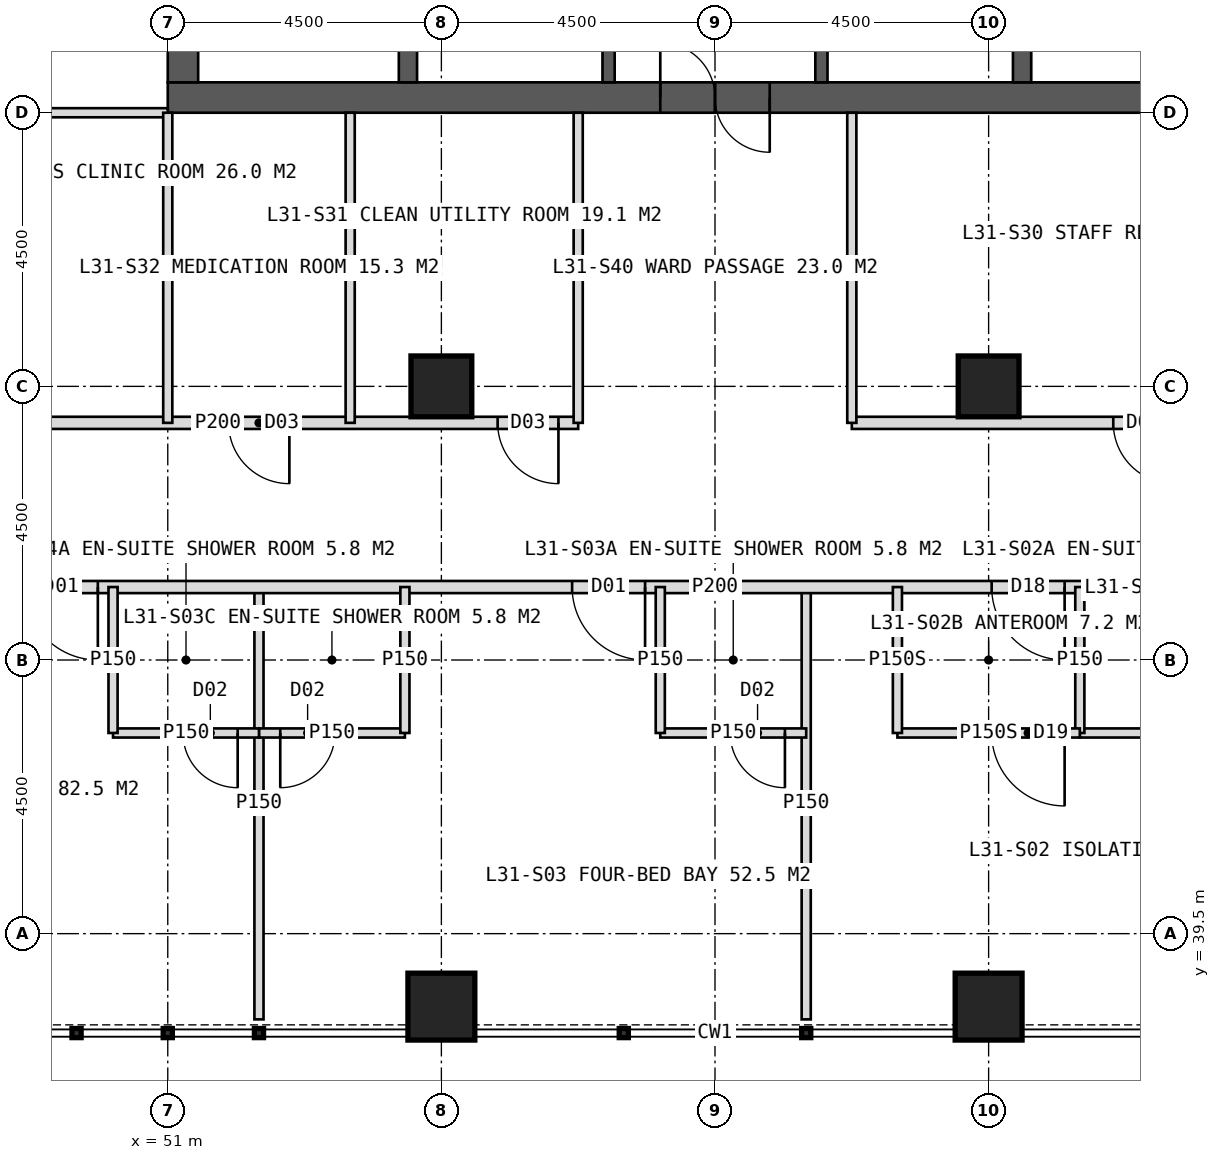
"""IFC4 building model, lengths in metres.
Left out: names, types, materials, properties, quantities, classifications, styles, units other than length and angle.
Written with IfcOpenShell. Run it as: python <this file> out.ifc"""

import sys

from ifc_helpers import new_model, si_unit, direction, frame, frame_2d, origin, origin_2d, place, context, subcontext, project, spatial, rectangle, hollow_rectangle, extrude, element, fill, save


model = new_model("IFC4")
c1 = context("Model", 3, precision=1e-05, world=origin(), true_north=direction((0.0, 1.0)))
c2 = subcontext(c1, "Body", "Model", "MODEL_VIEW")
j1 = project(units=[si_unit("LENGTHUNIT", "METRE"), si_unit("PLANEANGLEUNIT", "RADIAN")], contexts=[c1])
p1 = place(None, origin())
s1 = spatial("IfcSite", under=j1, at=p1, CompositionType="ELEMENT")
p2 = place(p1, origin())
s2 = spatial("IfcBuilding", under=s1, at=p2, CompositionType="ELEMENT")
p3 = place(p2, frame((0.0, 0.0, 132.0)))
s3 = spatial("IfcBuildingStorey", under=s2, at=p3, CompositionType="ELEMENT", Elevation=132.0)
p4 = place(p3, frame((51.0, 53.25, 0.0), z_axis=(0.0, 0.0, 1.0), x_axis=(1.0, 0.0, 0.0)))
e1 = element("IfcWall", 1, at=p4, inside=s3, PredefinedType="SHEAR", context=c2, shape_type="SweptSolid", body=[
    extrude(rectangle(XDim=18.0, YDim=0.5, at=frame_2d((9.0, 0.0))), origin(), (0.0, 0.0, 1.0), 4.0),
])
p5 = place(p4, frame((8.1, 0.0, 0.0)))
e2 = element("IfcOpeningElement", 2, at=p5, cuts=e1, PredefinedType="OPENING", context=c2, shape_type="SweptSolid", body=[
    extrude(rectangle(XDim=1.8, YDim=2.2, at=frame_2d((0.9, 1.1))), frame((0.0, 0.26, 0.0), z_axis=(0.0, -1.0, 0.0), x_axis=(1.0, 0.0, 0.0)), (0.0, 0.0, 1.0), 0.52),
])
p6 = place(p3, frame((51.25, 53.5, 0.0), z_axis=(0.0, 0.0, 1.0), x_axis=(0.0, 1.0, 0.0)))
e3 = element("IfcWall", 3, at=p6, inside=s3, PredefinedType="SHEAR", context=c2, shape_type="SweptSolid", body=[
    extrude(rectangle(XDim=17.0, YDim=0.5, at=frame_2d((8.5, 0.0))), origin(), (0.0, 0.0, 1.0), 4.0),
])
p7 = place(p6, frame((6.0, 0.0, 0.0)))
e4 = element("IfcOpeningElement", 4, at=p7, cuts=e3, PredefinedType="OPENING", context=c2, shape_type="SweptSolid", body=[
    extrude(rectangle(XDim=1.5, YDim=2.2, at=frame_2d((0.75, 1.1))), frame((0.0, 0.26, 0.0), z_axis=(0.0, -1.0, 0.0), x_axis=(1.0, 0.0, 0.0)), (0.0, 0.0, 1.0), 0.52),
])
for number, where, z_axis, x_axis in (
    (5, (54.95, 53.5, 0.0), (0.0, 0.0, 1.0), (0.0, 1.0, 0.0)),
    (6, (65.05, 53.5, 0.0), (0.0, 0.0, 1.0), (0.0, 1.0, 0.0)),
):
    element("IfcWall", number, at=place(p3, frame(where, z_axis=z_axis, x_axis=x_axis)), inside=s3, PredefinedType="SHEAR", context=c2, shape_type="SweptSolid", body=[
        extrude(rectangle(XDim=17.0, YDim=0.3, at=frame_2d((8.5, 0.0))), origin(), (0.0, 0.0, 1.0), 4.0),
    ])
p8 = place(p3, frame((58.25, 53.5, 0.0), z_axis=(0.0, 0.0, 1.0), x_axis=(0.0, 1.0, 0.0)))
e7 = element("IfcWall", 7, at=p8, inside=s3, PredefinedType="SHEAR", context=c2, shape_type="SweptSolid", body=[
    extrude(rectangle(XDim=17.0, YDim=0.2, at=frame_2d((8.5, 0.0))), origin(), (0.0, 0.0, 1.0), 4.0),
])
p9 = place(p8, frame((1.375, 0.0, 0.0)))
e8 = element("IfcOpeningElement", 8, at=p9, cuts=e7, PredefinedType="OPENING", context=c2, shape_type="SweptSolid", body=[
    extrude(rectangle(XDim=1.4, YDim=2.2, at=frame_2d((0.7, 1.1))), frame((0.0, 0.11, 0.0), z_axis=(0.0, -1.0, 0.0), x_axis=(1.0, 0.0, 0.0)), (0.0, 0.0, 1.0), 0.22),
])
p10 = place(p8, frame((5.675, 0.0, 0.0)))
e9 = element("IfcOpeningElement", 9, at=p10, cuts=e7, PredefinedType="OPENING", context=c2, shape_type="SweptSolid", body=[
    extrude(rectangle(XDim=1.4, YDim=2.2, at=frame_2d((0.7, 1.1))), frame((0.0, 0.11, 0.0), z_axis=(0.0, -1.0, 0.0), x_axis=(1.0, 0.0, 0.0)), (0.0, 0.0, 1.0), 0.22),
])
p11 = place(p3, frame((61.75, 53.5, 0.0), z_axis=(0.0, 0.0, 1.0), x_axis=(0.0, 1.0, 0.0)))
e10 = element("IfcWall", 10, at=p11, inside=s3, PredefinedType="SHEAR", context=c2, shape_type="SweptSolid", body=[
    extrude(rectangle(XDim=17.0, YDim=0.2, at=frame_2d((8.5, 0.0))), origin(), (0.0, 0.0, 1.0), 4.0),
])
p12 = place(p11, frame((1.375, 0.0, 0.0)))
e11 = element("IfcOpeningElement", 11, at=p12, cuts=e10, PredefinedType="OPENING", context=c2, shape_type="SweptSolid", body=[
    extrude(rectangle(XDim=1.4, YDim=2.2, at=frame_2d((0.7, 1.1))), frame((0.0, 0.11, 0.0), z_axis=(0.0, -1.0, 0.0), x_axis=(1.0, 0.0, 0.0)), (0.0, 0.0, 1.0), 0.22),
])
p13 = place(p11, frame((5.675, 0.0, 0.0)))
e12 = element("IfcOpeningElement", 12, at=p13, cuts=e10, PredefinedType="OPENING", context=c2, shape_type="SweptSolid", body=[
    extrude(rectangle(XDim=1.4, YDim=2.2, at=frame_2d((0.7, 1.1))), frame((0.0, 0.11, 0.0), z_axis=(0.0, -1.0, 0.0), x_axis=(1.0, 0.0, 0.0)), (0.0, 0.0, 1.0), 0.22),
])
for number, where, z_axis, x_axis in (
    (13, (55.5, 48.5, 0.0), (0.0, 0.0, 1.0), (1.0, 0.0, 0.0)),
    (14, (64.5, 48.5, 0.0), (0.0, 0.0, 1.0), (1.0, 0.0, 0.0)),
):
    element("IfcColumn", number, at=place(p3, frame(where, z_axis=z_axis, x_axis=x_axis)), inside=s3, PredefinedType="COLUMN", context=c2, shape_type="SweptSolid", body=[
        extrude(hollow_rectangle(XDim=1.0, YDim=1.0, WallThickness=0.1, at=origin_2d()), origin(), (0.0, 0.0, 1.0), 4.0),
    ])
for number, where, z_axis, x_axis in (
    (15, (55.5, 38.3, 0.0), (0.0, 0.0, 1.0), (1.0, 0.0, 0.0)),
    (16, (64.5, 38.3, 0.0), (0.0, 0.0, 1.0), (1.0, 0.0, 0.0)),
):
    element("IfcColumn", number, at=place(p3, frame(where, z_axis=z_axis, x_axis=x_axis)), inside=s3, PredefinedType="COLUMN", context=c2, shape_type="SweptSolid", body=[
        extrude(hollow_rectangle(XDim=1.1, YDim=1.1, WallThickness=0.1, at=origin_2d()), origin(), (0.0, 0.0, 1.0), 4.0),
    ])
p14 = place(p3, frame((51.0, 53.0, 0.0), z_axis=(0.0, 0.0, 1.0), x_axis=(-1.0, 0.0, 0.0)))
e17 = element("IfcWall", 17, at=p14, inside=s3, PredefinedType="PARTITIONING", context=c2, shape_type="SweptSolid", body=[
    extrude(rectangle(XDim=5.1, YDim=0.15, at=frame_2d((2.55, 0.0))), origin(), (0.0, 0.0, 1.0), 3.75),
])
for number, where, z_axis, x_axis in (
    (18, (61.5, 45.2, 0.0), (0.0, 0.0, 1.0), (0.0, -1.0, 0.0)),
    (19, (52.5, 45.2, 0.0), (0.0, 0.0, 1.0), (0.0, -1.0, 0.0)),
):
    element("IfcWall", number, at=place(p3, frame(where, z_axis=z_axis, x_axis=x_axis)), inside=s3, PredefinedType="PARTITIONING", context=c2, shape_type="SweptSolid", body=[
        extrude(rectangle(XDim=7.11, YDim=0.15, at=frame_2d((3.555, 0.0))), origin(), (0.0, 0.0, 1.0), 3.75),
    ])
p15 = place(p3, frame((76.8, 45.2, 0.0), z_axis=(0.0, 0.0, 1.0), x_axis=(-1.0, 0.0, 0.0)))
e20 = element("IfcWall", 20, at=p15, inside=s3, PredefinedType="PARTITIONING", context=c2, shape_type="SweptSolid", body=[
    extrude(rectangle(XDim=33.6, YDim=0.2, at=frame_2d((16.8, 0.0))), origin(), (0.0, 0.0, 1.0), 3.75),
])
p16 = place(p15, frame((2.65, 0.0, 0.0)))
e21 = element("IfcOpeningElement", 21, at=p16, cuts=e20, PredefinedType="OPENING", context=c2, shape_type="SweptSolid", body=[
    extrude(rectangle(XDim=1.2, YDim=2.2, at=frame_2d((0.6, 1.1))), frame((0.0, 0.11, 0.0), z_axis=(0.0, -1.0, 0.0), x_axis=(1.0, 0.0, 0.0)), (0.0, 0.0, 1.0), 0.22),
])
p17 = place(p15, frame((11.05, 0.0, 0.0)))
e22 = element("IfcOpeningElement", 22, at=p17, cuts=e20, PredefinedType="OPENING", context=c2, shape_type="SweptSolid", body=[
    extrude(rectangle(XDim=1.2, YDim=2.2, at=frame_2d((0.6, 1.1))), frame((0.0, 0.11, 0.0), z_axis=(0.0, -1.0, 0.0), x_axis=(1.0, 0.0, 0.0)), (0.0, 0.0, 1.0), 0.22),
])
p18 = place(p15, frame((17.95, 0.0, 0.0)))
e23 = element("IfcOpeningElement", 23, at=p18, cuts=e20, PredefinedType="OPENING", context=c2, shape_type="SweptSolid", body=[
    extrude(rectangle(XDim=1.2, YDim=2.2, at=frame_2d((0.6, 1.1))), frame((0.0, 0.11, 0.0), z_axis=(0.0, -1.0, 0.0), x_axis=(1.0, 0.0, 0.0)), (0.0, 0.0, 1.0), 0.22),
])
p19 = place(p15, frame((26.95, 0.0, 0.0)))
e24 = element("IfcOpeningElement", 24, at=p19, cuts=e20, PredefinedType="OPENING", context=c2, shape_type="SweptSolid", body=[
    extrude(rectangle(XDim=1.2, YDim=2.2, at=frame_2d((0.6, 1.1))), frame((0.0, 0.11, 0.0), z_axis=(0.0, -1.0, 0.0), x_axis=(1.0, 0.0, 0.0)), (0.0, 0.0, 1.0), 0.22),
])
p20 = place(p3, frame((69.0, 42.8, 0.0), z_axis=(0.0, 0.0, 1.0), x_axis=(-1.0, 0.0, 0.0)))
e25 = element("IfcWall", 25, at=p20, inside=s3, PredefinedType="PARTITIONING", context=c2, shape_type="SweptSolid", body=[
    extrude(rectangle(XDim=3.0, YDim=0.15, at=frame_2d((1.5, 0.0))), origin(), (0.0, 0.0, 1.0), 3.75),
])
p21 = place(p20, frame((0.35, 0.0, 0.0)))
e26 = element("IfcOpeningElement", 26, at=p21, cuts=e25, PredefinedType="OPENING", context=c2, shape_type="SweptSolid", body=[
    extrude(rectangle(XDim=0.9, YDim=2.1, at=frame_2d((0.45, 1.05))), frame((0.0, 0.085, 0.0), z_axis=(0.0, -1.0, 0.0), x_axis=(1.0, 0.0, 0.0)), (0.0, 0.0, 1.0), 0.17),
])
p22 = place(p3, frame((66.0, 45.2, 0.0), z_axis=(0.0, 0.0, 1.0), x_axis=(0.0, -1.0, 0.0)))
e27 = element("IfcWall", 27, at=p22, inside=s3, PredefinedType="PARTITIONING", context=c2, shape_type="SweptSolid", body=[
    extrude(rectangle(XDim=2.4, YDim=0.15, at=frame_2d((1.2, 0.0))), origin(), (0.0, 0.0, 1.0), 3.75),
])
p23 = place(p3, frame((66.0, 42.8, 0.0), z_axis=(0.0, 0.0, 1.0), x_axis=(-1.0, 0.0, 0.0)))
e28 = element("IfcWall", 28, at=p23, inside=s3, PredefinedType="PARTITIONING", context=c2, shape_type="SweptSolid", body=[
    extrude(rectangle(XDim=3.0, YDim=0.15, at=frame_2d((1.5, 0.0))), origin(), (0.0, 0.0, 1.0), 3.75),
])
p24 = place(p23, frame((0.25, 0.0, 0.0)))
e29 = element("IfcOpeningElement", 29, at=p24, cuts=e28, PredefinedType="OPENING", context=c2, shape_type="SweptSolid", body=[
    extrude(rectangle(XDim=1.2, YDim=2.2, at=frame_2d((0.6, 1.1))), frame((0.0, 0.085, 0.0), z_axis=(0.0, -1.0, 0.0), x_axis=(1.0, 0.0, 0.0)), (0.0, 0.0, 1.0), 0.17),
])
p25 = place(p3, frame((63.0, 45.2, 0.0), z_axis=(0.0, 0.0, 1.0), x_axis=(0.0, -1.0, 0.0)))
e30 = element("IfcWall", 30, at=p25, inside=s3, PredefinedType="PARTITIONING", context=c2, shape_type="SweptSolid", body=[
    extrude(rectangle(XDim=2.4, YDim=0.15, at=frame_2d((1.2, 0.0))), origin(), (0.0, 0.0, 1.0), 3.75),
])
p26 = place(p3, frame((61.5, 42.8, 0.0), z_axis=(0.0, 0.0, 1.0), x_axis=(-1.0, 0.0, 0.0)))
e31 = element("IfcWall", 31, at=p26, inside=s3, PredefinedType="PARTITIONING", context=c2, shape_type="SweptSolid", body=[
    extrude(rectangle(XDim=2.4, YDim=0.15, at=frame_2d((1.2, 0.0))), origin(), (0.0, 0.0, 1.0), 3.75),
])
p27 = place(p26, frame((0.35, 0.0, 0.0)))
e32 = element("IfcOpeningElement", 32, at=p27, cuts=e31, PredefinedType="OPENING", context=c2, shape_type="SweptSolid", body=[
    extrude(rectangle(XDim=0.9, YDim=2.1, at=frame_2d((0.45, 1.05))), frame((0.0, 0.085, 0.0), z_axis=(0.0, -1.0, 0.0), x_axis=(1.0, 0.0, 0.0)), (0.0, 0.0, 1.0), 0.17),
])
p28 = place(p3, frame((59.1, 45.2, 0.0), z_axis=(0.0, 0.0, 1.0), x_axis=(0.0, -1.0, 0.0)))
e33 = element("IfcWall", 33, at=p28, inside=s3, PredefinedType="PARTITIONING", context=c2, shape_type="SweptSolid", body=[
    extrude(rectangle(XDim=2.4, YDim=0.15, at=frame_2d((1.2, 0.0))), origin(), (0.0, 0.0, 1.0), 3.75),
])
p29 = place(p3, frame((54.9, 42.8, 0.0), z_axis=(0.0, 0.0, 1.0), x_axis=(-1.0, 0.0, 0.0)))
e34 = element("IfcWall", 34, at=p29, inside=s3, PredefinedType="PARTITIONING", context=c2, shape_type="SweptSolid", body=[
    extrude(rectangle(XDim=2.4, YDim=0.15, at=frame_2d((1.2, 0.0))), origin(), (0.0, 0.0, 1.0), 3.75),
])
p30 = place(p29, frame((1.15, 0.0, 0.0)))
e35 = element("IfcOpeningElement", 35, at=p30, cuts=e34, PredefinedType="OPENING", context=c2, shape_type="SweptSolid", body=[
    extrude(rectangle(XDim=0.9, YDim=2.1, at=frame_2d((0.45, 1.05))), frame((0.0, 0.085, 0.0), z_axis=(0.0, -1.0, 0.0), x_axis=(1.0, 0.0, 0.0)), (0.0, 0.0, 1.0), 0.17),
])
p31 = place(p3, frame((54.9, 45.2, 0.0), z_axis=(0.0, 0.0, 1.0), x_axis=(0.0, -1.0, 0.0)))
e36 = element("IfcWall", 36, at=p31, inside=s3, PredefinedType="PARTITIONING", context=c2, shape_type="SweptSolid", body=[
    extrude(rectangle(XDim=2.4, YDim=0.15, at=frame_2d((1.2, 0.0))), origin(), (0.0, 0.0, 1.0), 3.75),
])
p32 = place(p3, frame((52.5, 42.8, 0.0), z_axis=(0.0, 0.0, 1.0), x_axis=(-1.0, 0.0, 0.0)))
e37 = element("IfcWall", 37, at=p32, inside=s3, PredefinedType="PARTITIONING", context=c2, shape_type="SweptSolid", body=[
    extrude(rectangle(XDim=2.4, YDim=0.15, at=frame_2d((1.2, 0.0))), origin(), (0.0, 0.0, 1.0), 3.75),
])
p33 = place(p32, frame((0.35, 0.0, 0.0)))
e38 = element("IfcOpeningElement", 38, at=p33, cuts=e37, PredefinedType="OPENING", context=c2, shape_type="SweptSolid", body=[
    extrude(rectangle(XDim=0.9, YDim=2.1, at=frame_2d((0.45, 1.05))), frame((0.0, 0.085, 0.0), z_axis=(0.0, -1.0, 0.0), x_axis=(1.0, 0.0, 0.0)), (0.0, 0.0, 1.0), 0.17),
])
p34 = place(p3, frame((50.1, 45.2, 0.0), z_axis=(0.0, 0.0, 1.0), x_axis=(0.0, -1.0, 0.0)))
e39 = element("IfcWall", 39, at=p34, inside=s3, PredefinedType="PARTITIONING", context=c2, shape_type="SweptSolid", body=[
    extrude(rectangle(XDim=2.4, YDim=0.15, at=frame_2d((1.2, 0.0))), origin(), (0.0, 0.0, 1.0), 3.75),
])
p35 = place(p3, frame((74.1, 47.9, 0.0), z_axis=(0.0, 0.0, 1.0), x_axis=(-1.0, 0.0, 0.0)))
e40 = element("IfcWall", 40, at=p35, inside=s3, PredefinedType="PARTITIONING", context=c2, shape_type="SweptSolid", body=[
    extrude(rectangle(XDim=11.85, YDim=0.2, at=frame_2d((5.925, 0.0))), origin(), (0.0, 0.0, 1.0), 3.75),
])
p36 = place(p35, frame((6.55, 0.0, 0.0)))
e41 = element("IfcOpeningElement", 41, at=p36, cuts=e40, PredefinedType="OPENING", context=c2, shape_type="SweptSolid", body=[
    extrude(rectangle(XDim=1.0, YDim=2.1, at=frame_2d((0.5, 1.05))), frame((0.0, 0.11, 0.0), z_axis=(0.0, -1.0, 0.0), x_axis=(1.0, 0.0, 0.0)), (0.0, 0.0, 1.0), 0.22),
])
p37 = place(p3, frame((57.75, 47.9, 0.0), z_axis=(0.0, 0.0, 1.0), x_axis=(-1.0, 0.0, 0.0)))
e42 = element("IfcWall", 42, at=p37, inside=s3, PredefinedType="PARTITIONING", context=c2, shape_type="SweptSolid", body=[
    extrude(rectangle(XDim=11.85, YDim=0.2, at=frame_2d((5.925, 0.0))), origin(), (0.0, 0.0, 1.0), 3.75),
])
p38 = place(p37, frame((0.325, 0.0, 0.0)))
e43 = element("IfcOpeningElement", 43, at=p38, cuts=e42, PredefinedType="OPENING", context=c2, shape_type="SweptSolid", body=[
    extrude(rectangle(XDim=1.0, YDim=2.1, at=frame_2d((0.5, 1.05))), frame((0.0, 0.11, 0.0), z_axis=(0.0, -1.0, 0.0), x_axis=(1.0, 0.0, 0.0)), (0.0, 0.0, 1.0), 0.22),
])
p39 = place(p37, frame((4.75, 0.0, 0.0)))
e44 = element("IfcOpeningElement", 44, at=p39, cuts=e42, PredefinedType="OPENING", context=c2, shape_type="SweptSolid", body=[
    extrude(rectangle(XDim=1.0, YDim=2.1, at=frame_2d((0.5, 1.05))), frame((0.0, 0.11, 0.0), z_axis=(0.0, -1.0, 0.0), x_axis=(1.0, 0.0, 0.0)), (0.0, 0.0, 1.0), 0.22),
])
p40 = place(p37, frame((8.8, 0.0, 0.0)))
e45 = element("IfcOpeningElement", 45, at=p40, cuts=e42, PredefinedType="OPENING", context=c2, shape_type="SweptSolid", body=[
    extrude(rectangle(XDim=1.0, YDim=2.1, at=frame_2d((0.5, 1.05))), frame((0.0, 0.11, 0.0), z_axis=(0.0, -1.0, 0.0), x_axis=(1.0, 0.0, 0.0)), (0.0, 0.0, 1.0), 0.22),
])
for number, where, z_axis, x_axis in (
    (46, (62.25, 53.0, 0.0), (0.0, 0.0, 1.0), (0.0, -1.0, 0.0)),
    (47, (57.75, 53.0, 0.0), (0.0, 0.0, 1.0), (0.0, -1.0, 0.0)),
    (48, (54.0, 53.0, 0.0), (0.0, 0.0, 1.0), (0.0, -1.0, 0.0)),
    (49, (51.0, 53.0, 0.0), (0.0, 0.0, 1.0), (0.0, -1.0, 0.0)),
):
    element("IfcWall", number, at=place(p3, frame(where, z_axis=z_axis, x_axis=x_axis)), inside=s3, PredefinedType="PARTITIONING", context=c2, shape_type="SweptSolid", body=[
        extrude(rectangle(XDim=5.1, YDim=0.15, at=frame_2d((2.55, 0.0))), origin(), (0.0, 0.0, 1.0), 3.75),
    ])
p41 = place(p24, origin())
e50 = element("IfcDoor", 50, at=p41, inside=s3, OperationType="SINGLE_SWING_LEFT", PredefinedType="DOOR", context=c2, shape_type="SweptSolid", body=[
    extrude(rectangle(XDim=1.2, YDim=2.2, at=frame_2d((0.6, 1.1))), frame((0.0, 0.025, 0.0), z_axis=(0.0, -1.0, 0.0), x_axis=(1.0, 0.0, 0.0)), (0.0, 0.0, 1.0), 0.05),
])
fill(e29, e50)
p42 = place(p17, origin())
e51 = element("IfcDoor", 51, at=p42, inside=s3, OperationType="SINGLE_SWING_LEFT", PredefinedType="DOOR", context=c2, shape_type="SweptSolid", body=[
    extrude(rectangle(XDim=1.2, YDim=2.2, at=frame_2d((0.6, 1.1))), frame((0.0, 0.025, 0.0), z_axis=(0.0, -1.0, 0.0), x_axis=(1.0, 0.0, 0.0)), (0.0, 0.0, 1.0), 0.05),
])
fill(e22, e51)
p43 = place(p18, origin())
e52 = element("IfcDoor", 52, at=p43, inside=s3, OperationType="SINGLE_SWING_LEFT", PredefinedType="DOOR", context=c2, shape_type="SweptSolid", body=[
    extrude(rectangle(XDim=1.2, YDim=2.2, at=frame_2d((0.6, 1.1))), frame((0.0, 0.025, 0.0), z_axis=(0.0, -1.0, 0.0), x_axis=(1.0, 0.0, 0.0)), (0.0, 0.0, 1.0), 0.05),
])
fill(e23, e52)
p44 = place(p27, origin())
e53 = element("IfcDoor", 53, at=p44, inside=s3, OperationType="SINGLE_SWING_LEFT", PredefinedType="DOOR", context=c2, shape_type="SweptSolid", body=[
    extrude(rectangle(XDim=0.9, YDim=2.1, at=frame_2d((0.45, 1.05))), frame((0.0, 0.025, 0.0), z_axis=(0.0, -1.0, 0.0), x_axis=(1.0, 0.0, 0.0)), (0.0, 0.0, 1.0), 0.05),
])
fill(e32, e53)
p45 = place(p30, origin())
e54 = element("IfcDoor", 54, at=p45, inside=s3, OperationType="SINGLE_SWING_RIGHT", PredefinedType="DOOR", context=c2, shape_type="SweptSolid", body=[
    extrude(rectangle(XDim=0.9, YDim=2.1, at=frame_2d((0.45, 1.05))), frame((0.0, 0.025, 0.0), z_axis=(0.0, -1.0, 0.0), x_axis=(1.0, 0.0, 0.0)), (0.0, 0.0, 1.0), 0.05),
])
fill(e35, e54)
p46 = place(p19, origin())
e55 = element("IfcDoor", 55, at=p46, inside=s3, OperationType="SINGLE_SWING_LEFT", PredefinedType="DOOR", context=c2, shape_type="SweptSolid", body=[
    extrude(rectangle(XDim=1.2, YDim=2.2, at=frame_2d((0.6, 1.1))), frame((0.0, 0.025, 0.0), z_axis=(0.0, -1.0, 0.0), x_axis=(1.0, 0.0, 0.0)), (0.0, 0.0, 1.0), 0.05),
])
fill(e24, e55)
p47 = place(p33, origin())
e56 = element("IfcDoor", 56, at=p47, inside=s3, OperationType="SINGLE_SWING_LEFT", PredefinedType="DOOR", context=c2, shape_type="SweptSolid", body=[
    extrude(rectangle(XDim=0.9, YDim=2.1, at=frame_2d((0.45, 1.05))), frame((0.0, 0.025, 0.0), z_axis=(0.0, -1.0, 0.0), x_axis=(1.0, 0.0, 0.0)), (0.0, 0.0, 1.0), 0.05),
])
fill(e38, e56)
p48 = place(p36, origin())
e57 = element("IfcDoor", 57, at=p48, inside=s3, OperationType="SINGLE_SWING_LEFT", PredefinedType="DOOR", context=c2, shape_type="SweptSolid", body=[
    extrude(rectangle(XDim=1.0, YDim=2.1, at=frame_2d((0.5, 1.05))), frame((0.0, 0.025, 0.0), z_axis=(0.0, -1.0, 0.0), x_axis=(1.0, 0.0, 0.0)), (0.0, 0.0, 1.0), 0.05),
])
fill(e41, e57)
p49 = place(p38, origin())
e58 = element("IfcDoor", 58, at=p49, inside=s3, OperationType="SINGLE_SWING_LEFT", PredefinedType="DOOR", context=c2, shape_type="SweptSolid", body=[
    extrude(rectangle(XDim=1.0, YDim=2.1, at=frame_2d((0.5, 1.05))), frame((0.0, 0.025, 0.0), z_axis=(0.0, -1.0, 0.0), x_axis=(1.0, 0.0, 0.0)), (0.0, 0.0, 1.0), 0.05),
])
fill(e43, e58)
p50 = place(p39, origin())
e59 = element("IfcDoor", 59, at=p50, inside=s3, OperationType="SINGLE_SWING_LEFT", PredefinedType="DOOR", context=c2, shape_type="SweptSolid", body=[
    extrude(rectangle(XDim=1.0, YDim=2.1, at=frame_2d((0.5, 1.05))), frame((0.0, 0.025, 0.0), z_axis=(0.0, -1.0, 0.0), x_axis=(1.0, 0.0, 0.0)), (0.0, 0.0, 1.0), 0.05),
])
fill(e44, e59)
p51 = place(p5, origin())
e60 = element("IfcDoor", 60, at=p51, inside=s3, OperationType="DOUBLE_DOOR_SINGLE_SWING", PredefinedType="DOOR", context=c2, shape_type="SweptSolid", body=[
    extrude(rectangle(XDim=1.8, YDim=2.2, at=frame_2d((0.9, 1.1))), frame((0.0, 0.025, 0.0), z_axis=(0.0, -1.0, 0.0), x_axis=(1.0, 0.0, 0.0)), (0.0, 0.0, 1.0), 0.05),
])
fill(e2, e60)
save(model, sys.argv[1])
